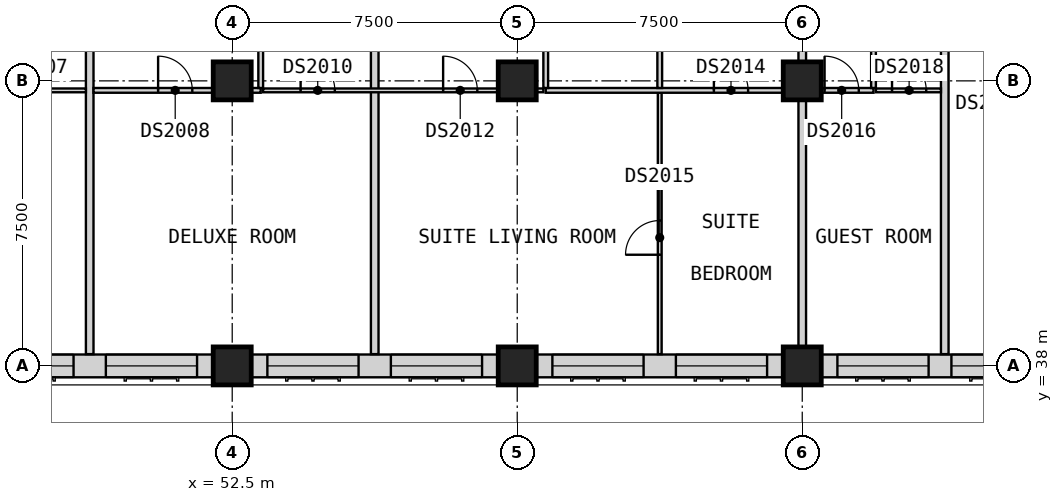
"""IFC4 building model, lengths in metres.
Left out: names, types, materials, properties, quantities, classifications, styles, units other than length and angle.
Written with IfcOpenShell. Run it as: python <this file> out.ifc"""

import sys

from ifc_helpers import new_model, si_unit, direction, frame, frame_2d, origin, origin_2d, place, context, subcontext, project, spatial, rectangle, extrude, element, fill, save


model = new_model("IFC4")
c1 = context("Model", 3, precision=1e-05, world=origin(), true_north=direction((0.0, 1.0)))
c2 = subcontext(c1, "Body", "Model", "MODEL_VIEW")
j1 = project(units=[si_unit("LENGTHUNIT", "METRE"), si_unit("PLANEANGLEUNIT", "RADIAN")], contexts=[c1])
p1 = place(None, origin())
s1 = spatial("IfcSite", under=j1, at=p1, CompositionType="ELEMENT")
p2 = place(p1, origin())
s2 = spatial("IfcBuilding", under=s1, at=p2, CompositionType="ELEMENT")
p3 = place(p2, frame((0.0, 0.0, 162.6)))
s3 = spatial("IfcBuildingStorey", under=s2, at=p3, CompositionType="ELEMENT", Elevation=162.6)
for number, where, z_axis, x_axis in (
    (1, (52.5, 38.0, 0.0), (0.0, 0.0, 1.0), (1.0, 0.0, 0.0)),
    (2, (52.5, 45.5, 0.0), (0.0, 0.0, 1.0), (1.0, 0.0, 0.0)),
    (3, (60.0, 38.0, 0.0), (0.0, 0.0, 1.0), (1.0, 0.0, 0.0)),
    (4, (60.0, 45.5, 0.0), (0.0, 0.0, 1.0), (1.0, 0.0, 0.0)),
    (5, (67.5, 38.0, 0.0), (0.0, 0.0, 1.0), (1.0, 0.0, 0.0)),
    (6, (67.5, 45.5, 0.0), (0.0, 0.0, 1.0), (1.0, 0.0, 0.0)),
):
    element("IfcColumn", number, at=place(p3, frame(where, z_axis=z_axis, x_axis=x_axis)), inside=s3, PredefinedType="COLUMN", context=c2, shape_type="SweptSolid", body=[
        extrude(rectangle(XDim=1.0, YDim=1.0, at=origin_2d()), origin(), (0.0, 0.0, 1.0), 3.6),
    ])
p4 = place(p3, frame((45.5, 38.0, 0.0), z_axis=(0.0, 0.0, 1.0), x_axis=(1.0, 0.0, 0.0)))
e7 = element("IfcWall", 7, at=p4, inside=s3, PredefinedType="SOLIDWALL", context=c2, shape_type="SweptSolid", body=[
    extrude(rectangle(XDim=6.5, YDim=0.6, at=frame_2d((3.25, 0.0))), origin(), (0.0, 0.0, 1.0), 2.85),
])
p5 = place(p4, frame((0.425, 0.0, 0.8)))
e8 = element("IfcOpeningElement", 8, at=p5, cuts=e7, PredefinedType="OPENING", context=c2, shape_type="SweptSolid", body=[
    extrude(rectangle(XDim=2.4, YDim=1.8, at=frame_2d((1.2, 0.9))), frame((0.0, 0.31, 0.0), z_axis=(0.0, -1.0, 0.0), x_axis=(1.0, 0.0, 0.0)), (0.0, 0.0, 1.0), 0.62),
])
p6 = place(p4, frame((3.675, 0.0, 0.8)))
e9 = element("IfcOpeningElement", 9, at=p6, cuts=e7, PredefinedType="OPENING", context=c2, shape_type="SweptSolid", body=[
    extrude(rectangle(XDim=2.4, YDim=1.8, at=frame_2d((1.2, 0.9))), frame((0.0, 0.31, 0.0), z_axis=(0.0, -1.0, 0.0), x_axis=(1.0, 0.0, 0.0)), (0.0, 0.0, 1.0), 0.62),
])
p7 = place(p3, frame((53.0, 38.0, 0.0), z_axis=(0.0, 0.0, 1.0), x_axis=(1.0, 0.0, 0.0)))
e10 = element("IfcWall", 10, at=p7, inside=s3, PredefinedType="SOLIDWALL", context=c2, shape_type="SweptSolid", body=[
    extrude(rectangle(XDim=6.5, YDim=0.6, at=frame_2d((3.25, 0.0))), origin(), (0.0, 0.0, 1.0), 2.85),
])
p8 = place(p7, frame((0.425, 0.0, 0.8)))
e11 = element("IfcOpeningElement", 11, at=p8, cuts=e10, PredefinedType="OPENING", context=c2, shape_type="SweptSolid", body=[
    extrude(rectangle(XDim=2.4, YDim=1.8, at=frame_2d((1.2, 0.9))), frame((0.0, 0.31, 0.0), z_axis=(0.0, -1.0, 0.0), x_axis=(1.0, 0.0, 0.0)), (0.0, 0.0, 1.0), 0.62),
])
p9 = place(p7, frame((3.675, 0.0, 0.8)))
e12 = element("IfcOpeningElement", 12, at=p9, cuts=e10, PredefinedType="OPENING", context=c2, shape_type="SweptSolid", body=[
    extrude(rectangle(XDim=2.4, YDim=1.8, at=frame_2d((1.2, 0.9))), frame((0.0, 0.31, 0.0), z_axis=(0.0, -1.0, 0.0), x_axis=(1.0, 0.0, 0.0)), (0.0, 0.0, 1.0), 0.62),
])
p10 = place(p3, frame((60.5, 38.0, 0.0), z_axis=(0.0, 0.0, 1.0), x_axis=(1.0, 0.0, 0.0)))
e13 = element("IfcWall", 13, at=p10, inside=s3, PredefinedType="SOLIDWALL", context=c2, shape_type="SweptSolid", body=[
    extrude(rectangle(XDim=6.5, YDim=0.6, at=frame_2d((3.25, 0.0))), origin(), (0.0, 0.0, 1.0), 2.85),
])
p11 = place(p10, frame((0.425, 0.0, 0.8)))
e14 = element("IfcOpeningElement", 14, at=p11, cuts=e13, PredefinedType="OPENING", context=c2, shape_type="SweptSolid", body=[
    extrude(rectangle(XDim=2.4, YDim=1.8, at=frame_2d((1.2, 0.9))), frame((0.0, 0.31, 0.0), z_axis=(0.0, -1.0, 0.0), x_axis=(1.0, 0.0, 0.0)), (0.0, 0.0, 1.0), 0.62),
])
p12 = place(p10, frame((3.675, 0.0, 0.8)))
e15 = element("IfcOpeningElement", 15, at=p12, cuts=e13, PredefinedType="OPENING", context=c2, shape_type="SweptSolid", body=[
    extrude(rectangle(XDim=2.4, YDim=1.8, at=frame_2d((1.2, 0.9))), frame((0.0, 0.31, 0.0), z_axis=(0.0, -1.0, 0.0), x_axis=(1.0, 0.0, 0.0)), (0.0, 0.0, 1.0), 0.62),
])
p13 = place(p3, frame((68.0, 38.0, 0.0), z_axis=(0.0, 0.0, 1.0), x_axis=(1.0, 0.0, 0.0)))
e16 = element("IfcWall", 16, at=p13, inside=s3, PredefinedType="SOLIDWALL", context=c2, shape_type="SweptSolid", body=[
    extrude(rectangle(XDim=6.0, YDim=0.6, at=frame_2d((3.0, 0.0))), origin(), (0.0, 0.0, 1.0), 2.85),
])
p14 = place(p13, frame((0.425, 0.0, 0.8)))
e17 = element("IfcOpeningElement", 17, at=p14, cuts=e16, PredefinedType="OPENING", context=c2, shape_type="SweptSolid", body=[
    extrude(rectangle(XDim=2.4, YDim=1.8, at=frame_2d((1.2, 0.9))), frame((0.0, 0.31, 0.0), z_axis=(0.0, -1.0, 0.0), x_axis=(1.0, 0.0, 0.0)), (0.0, 0.0, 1.0), 0.62),
])
p15 = place(p13, frame((3.425, 0.0, 0.8)))
e18 = element("IfcOpeningElement", 18, at=p15, cuts=e16, PredefinedType="OPENING", context=c2, shape_type="SweptSolid", body=[
    extrude(rectangle(XDim=2.4, YDim=1.8, at=frame_2d((1.2, 0.9))), frame((0.0, 0.31, 0.0), z_axis=(0.0, -1.0, 0.0), x_axis=(1.0, 0.0, 0.0)), (0.0, 0.0, 1.0), 0.62),
])
for number, where, z_axis, x_axis in (
    (19, (48.75, 38.31, 0.0), (0.0, 0.0, 1.0), (0.0, 1.0, 0.0)),
    (20, (56.25, 38.31, 0.0), (0.0, 0.0, 1.0), (0.0, 1.0, 0.0)),
):
    element("IfcWall", number, at=place(p3, frame(where, z_axis=z_axis, x_axis=x_axis)), inside=s3, PredefinedType="PARTITIONING", context=c2, shape_type="SweptSolid", body=[
        extrude(rectangle(XDim=11.715, YDim=0.2, at=frame_2d((5.857, 0.0))), origin(), (0.0, 0.0, 1.0), 3.2),
    ])
p16 = place(p3, frame((67.5, 37.5, 0.0), z_axis=(0.0, 0.0, 1.0), x_axis=(0.0, 1.0, 0.0)))
e21 = element("IfcWall", 21, at=p16, inside=s3, PredefinedType="PARTITIONING", context=c2, shape_type="SweptSolid", body=[
    extrude(rectangle(XDim=12.525, YDim=0.2, at=frame_2d((6.262, 0.0))), origin(), (0.0, 0.0, 1.0), 3.2),
])
p17 = place(p3, frame((71.25, 38.31, 0.0), z_axis=(0.0, 0.0, 1.0), x_axis=(0.0, 1.0, 0.0)))
e22 = element("IfcWall", 22, at=p17, inside=s3, PredefinedType="PARTITIONING", context=c2, shape_type="SweptSolid", body=[
    extrude(rectangle(XDim=11.715, YDim=0.2, at=frame_2d((5.857, 0.0))), origin(), (0.0, 0.0, 1.0), 3.2),
])
p18 = place(p3, frame((45.812, 45.25, 0.0), z_axis=(0.0, 0.0, 1.0), x_axis=(1.0, 0.0, 0.0)))
e23 = element("IfcWall", 23, at=p18, inside=s3, PredefinedType="PARTITIONING", context=c2, shape_type="SweptSolid", body=[
    extrude(rectangle(XDim=2.837, YDim=0.1, at=frame_2d((1.419, 0.0))), origin(), (0.0, 0.0, 1.0), 3.2),
])
p19 = place(p18, frame((0.988, 0.0, 0.0)))
e24 = element("IfcOpeningElement", 24, at=p19, cuts=e23, PredefinedType="OPENING", context=c2, shape_type="SweptSolid", body=[
    extrude(rectangle(XDim=0.9, YDim=2.1, at=frame_2d((0.45, 1.05))), frame((0.0, 0.06, 0.0), z_axis=(0.0, -1.0, 0.0), x_axis=(1.0, 0.0, 0.0)), (0.0, 0.0, 1.0), 0.12),
])
p20 = place(p3, frame((53.312, 45.25, 0.0), z_axis=(0.0, 0.0, 1.0), x_axis=(1.0, 0.0, 0.0)))
e25 = element("IfcWall", 25, at=p20, inside=s3, PredefinedType="PARTITIONING", context=c2, shape_type="SweptSolid", body=[
    extrude(rectangle(XDim=7.375, YDim=0.1, at=frame_2d((3.688, 0.0))), origin(), (0.0, 0.0, 1.0), 3.2),
])
p21 = place(p20, frame((0.988, 0.0, 0.0)))
e26 = element("IfcOpeningElement", 26, at=p21, cuts=e25, PredefinedType="OPENING", context=c2, shape_type="SweptSolid", body=[
    extrude(rectangle(XDim=0.9, YDim=2.1, at=frame_2d((0.45, 1.05))), frame((0.0, 0.06, 0.0), z_axis=(0.0, -1.0, 0.0), x_axis=(1.0, 0.0, 0.0)), (0.0, 0.0, 1.0), 0.12),
])
p22 = place(p20, frame((4.738, 0.0, 0.0)))
e27 = element("IfcOpeningElement", 27, at=p22, cuts=e25, PredefinedType="OPENING", context=c2, shape_type="SweptSolid", body=[
    extrude(rectangle(XDim=0.9, YDim=2.1, at=frame_2d((0.45, 1.05))), frame((0.0, 0.06, 0.0), z_axis=(0.0, -1.0, 0.0), x_axis=(1.0, 0.0, 0.0)), (0.0, 0.0, 1.0), 0.12),
])
p23 = place(p3, frame((69.438, 45.25, 0.0), z_axis=(0.0, 0.0, 1.0), x_axis=(1.0, 0.0, 0.0)))
e28 = element("IfcWall", 28, at=p23, inside=s3, PredefinedType="PARTITIONING", context=c2, shape_type="SweptSolid", body=[
    extrude(rectangle(XDim=1.712, YDim=0.1, at=frame_2d((0.856, 0.0))), origin(), (0.0, 0.0, 1.0), 3.2),
])
p24 = place(p23, frame((0.425, 0.0, 0.0)))
e29 = element("IfcOpeningElement", 29, at=p24, cuts=e28, PredefinedType="OPENING", context=c2, shape_type="SweptSolid", body=[
    extrude(rectangle(XDim=0.9, YDim=2.1, at=frame_2d((0.45, 1.05))), frame((0.0, 0.06, 0.0), z_axis=(0.0, -1.0, 0.0), x_axis=(1.0, 0.0, 0.0)), (0.0, 0.0, 1.0), 0.12),
])
p25 = place(p3, frame((63.75, 38.31, 0.0), z_axis=(0.0, 0.0, 1.0), x_axis=(0.0, 1.0, 0.0)))
e30 = element("IfcWall", 30, at=p25, inside=s3, PredefinedType="PARTITIONING", context=c2, shape_type="SweptSolid", body=[
    extrude(rectangle(XDim=6.877, YDim=0.1, at=frame_2d((3.439, 0.0))), origin(), (0.0, 0.0, 1.0), 3.2),
])
p26 = place(p25, frame((2.615, 0.0, 0.0)))
e31 = element("IfcOpeningElement", 31, at=p26, cuts=e30, PredefinedType="OPENING", context=c2, shape_type="SweptSolid", body=[
    extrude(rectangle(XDim=0.9, YDim=2.1, at=frame_2d((0.45, 1.05))), frame((0.0, 0.06, 0.0), z_axis=(0.0, -1.0, 0.0), x_axis=(1.0, 0.0, 0.0)), (0.0, 0.0, 1.0), 0.12),
])
p27 = place(p3, frame((48.85, 45.25, 0.0), z_axis=(0.0, 0.0, 1.0), x_axis=(1.0, 0.0, 0.0)))
e32 = element("IfcWall", 32, at=p27, inside=s3, PredefinedType="PARTITIONING", context=c2, shape_type="SweptSolid", body=[
    extrude(rectangle(XDim=4.4, YDim=0.125, at=frame_2d((2.2, 0.0))), origin(), (0.0, 0.0, 1.0), 3.2),
])
p28 = place(p27, frame((1.7, 0.0, 0.0)))
e33 = element("IfcOpeningElement", 33, at=p28, cuts=e32, PredefinedType="OPENING", context=c2, shape_type="SweptSolid", body=[
    extrude(rectangle(XDim=0.9, YDim=2.1, at=frame_2d((0.45, 1.05))), frame((0.0, 0.073, 0.0), z_axis=(0.0, -1.0, 0.0), x_axis=(1.0, 0.0, 0.0)), (0.0, 0.0, 1.0), 0.145),
])
p29 = place(p3, frame((60.75, 45.25, 0.0), z_axis=(0.0, 0.0, 1.0), x_axis=(1.0, 0.0, 0.0)))
e34 = element("IfcWall", 34, at=p29, inside=s3, PredefinedType="PARTITIONING", context=c2, shape_type="SweptSolid", body=[
    extrude(rectangle(XDim=8.625, YDim=0.125, at=frame_2d((4.312, 0.0))), origin(), (0.0, 0.0, 1.0), 3.2),
])
p30 = place(p29, frame((4.425, 0.0, 0.0)))
e35 = element("IfcOpeningElement", 35, at=p30, cuts=e34, PredefinedType="OPENING", context=c2, shape_type="SweptSolid", body=[
    extrude(rectangle(XDim=0.9, YDim=2.1, at=frame_2d((0.45, 1.05))), frame((0.0, 0.073, 0.0), z_axis=(0.0, -1.0, 0.0), x_axis=(1.0, 0.0, 0.0)), (0.0, 0.0, 1.0), 0.145),
])
p31 = place(p29, frame((7.337, 0.0, 0.0)))
e36 = element("IfcOpeningElement", 36, at=p31, cuts=e34, PredefinedType="OPENING", context=c2, shape_type="SweptSolid", body=[
    extrude(rectangle(XDim=0.9, YDim=2.1, at=frame_2d((0.45, 1.05))), frame((0.0, 0.073, 0.0), z_axis=(0.0, -1.0, 0.0), x_axis=(1.0, 0.0, 0.0)), (0.0, 0.0, 1.0), 0.145),
])
p32 = place(p3, frame((53.25, 45.312, 0.0), z_axis=(0.0, 0.0, 1.0), x_axis=(0.0, 1.0, 0.0)))
e37 = element("IfcWall", 37, at=p32, inside=s3, PredefinedType="PARTITIONING", context=c2, shape_type="SweptSolid", body=[
    extrude(rectangle(XDim=4.712, YDim=0.125, at=frame_2d((2.356, 0.0))), origin(), (0.0, 0.0, 1.0), 3.2),
])
p33 = place(p3, frame((60.75, 45.312, 0.0), z_axis=(0.0, 0.0, 1.0), x_axis=(0.0, 1.0, 0.0)))
e38 = element("IfcWall", 38, at=p33, inside=s3, PredefinedType="PARTITIONING", context=c2, shape_type="SweptSolid", body=[
    extrude(rectangle(XDim=4.712, YDim=0.125, at=frame_2d((2.356, 0.0))), origin(), (0.0, 0.0, 1.0), 3.2),
])
p34 = place(p33, frame((1.913, 0.0, 0.0)))
e39 = element("IfcOpeningElement", 39, at=p34, cuts=e38, PredefinedType="OPENING", context=c2, shape_type="SweptSolid", body=[
    extrude(rectangle(XDim=0.9, YDim=2.1, at=frame_2d((0.45, 1.05))), frame((0.0, 0.073, 0.0), z_axis=(0.0, -1.0, 0.0), x_axis=(1.0, 0.0, 0.0)), (0.0, 0.0, 1.0), 0.145),
])
for number, where, z_axis, x_axis in (
    (40, (63.75, 45.312, 0.0), (0.0, 0.0, 1.0), (0.0, 1.0, 0.0)),
    (41, (69.375, 45.312, 0.0), (0.0, 0.0, 1.0), (0.0, 1.0, 0.0)),
):
    element("IfcWall", number, at=place(p3, frame(where, z_axis=z_axis, x_axis=x_axis)), inside=s3, PredefinedType="PARTITIONING", context=c2, shape_type="SweptSolid", body=[
        extrude(rectangle(XDim=4.712, YDim=0.125, at=frame_2d((2.356, 0.0))), origin(), (0.0, 0.0, 1.0), 3.2),
    ])
p35 = place(p5, origin())
e42 = element("IfcWindow", 42, at=p35, inside=s3, PartitioningType="SINGLE_PANEL", PredefinedType="WINDOW", context=c2, shape_type="SweptSolid", body=[
    extrude(rectangle(XDim=2.4, YDim=1.8, at=frame_2d((1.2, 0.9))), frame((0.0, -0.07, 0.0), z_axis=(0.0, -1.0, 0.0), x_axis=(1.0, 0.0, 0.0)), (0.0, 0.0, 1.0), 0.06),
])
fill(e8, e42)
p36 = place(p6, origin())
e43 = element("IfcWindow", 43, at=p36, inside=s3, PartitioningType="SINGLE_PANEL", PredefinedType="WINDOW", context=c2, shape_type="SweptSolid", body=[
    extrude(rectangle(XDim=2.4, YDim=1.8, at=frame_2d((1.2, 0.9))), frame((0.0, -0.07, 0.0), z_axis=(0.0, -1.0, 0.0), x_axis=(1.0, 0.0, 0.0)), (0.0, 0.0, 1.0), 0.06),
])
fill(e9, e43)
p37 = place(p8, origin())
e44 = element("IfcWindow", 44, at=p37, inside=s3, PartitioningType="SINGLE_PANEL", PredefinedType="WINDOW", context=c2, shape_type="SweptSolid", body=[
    extrude(rectangle(XDim=2.4, YDim=1.8, at=frame_2d((1.2, 0.9))), frame((0.0, -0.07, 0.0), z_axis=(0.0, -1.0, 0.0), x_axis=(1.0, 0.0, 0.0)), (0.0, 0.0, 1.0), 0.06),
])
fill(e11, e44)
p38 = place(p9, origin())
e45 = element("IfcWindow", 45, at=p38, inside=s3, PartitioningType="SINGLE_PANEL", PredefinedType="WINDOW", context=c2, shape_type="SweptSolid", body=[
    extrude(rectangle(XDim=2.4, YDim=1.8, at=frame_2d((1.2, 0.9))), frame((0.0, -0.07, 0.0), z_axis=(0.0, -1.0, 0.0), x_axis=(1.0, 0.0, 0.0)), (0.0, 0.0, 1.0), 0.06),
])
fill(e12, e45)
p39 = place(p11, origin())
e46 = element("IfcWindow", 46, at=p39, inside=s3, PartitioningType="SINGLE_PANEL", PredefinedType="WINDOW", context=c2, shape_type="SweptSolid", body=[
    extrude(rectangle(XDim=2.4, YDim=1.8, at=frame_2d((1.2, 0.9))), frame((0.0, -0.07, 0.0), z_axis=(0.0, -1.0, 0.0), x_axis=(1.0, 0.0, 0.0)), (0.0, 0.0, 1.0), 0.06),
])
fill(e14, e46)
p40 = place(p12, origin())
e47 = element("IfcWindow", 47, at=p40, inside=s3, PartitioningType="SINGLE_PANEL", PredefinedType="WINDOW", context=c2, shape_type="SweptSolid", body=[
    extrude(rectangle(XDim=2.4, YDim=1.8, at=frame_2d((1.2, 0.9))), frame((0.0, -0.07, 0.0), z_axis=(0.0, -1.0, 0.0), x_axis=(1.0, 0.0, 0.0)), (0.0, 0.0, 1.0), 0.06),
])
fill(e15, e47)
p41 = place(p14, origin())
e48 = element("IfcWindow", 48, at=p41, inside=s3, PartitioningType="SINGLE_PANEL", PredefinedType="WINDOW", context=c2, shape_type="SweptSolid", body=[
    extrude(rectangle(XDim=2.4, YDim=1.8, at=frame_2d((1.2, 0.9))), frame((0.0, -0.07, 0.0), z_axis=(0.0, -1.0, 0.0), x_axis=(1.0, 0.0, 0.0)), (0.0, 0.0, 1.0), 0.06),
])
fill(e17, e48)
p42 = place(p15, origin())
e49 = element("IfcWindow", 49, at=p42, inside=s3, PartitioningType="SINGLE_PANEL", PredefinedType="WINDOW", context=c2, shape_type="SweptSolid", body=[
    extrude(rectangle(XDim=2.4, YDim=1.8, at=frame_2d((1.2, 0.9))), frame((0.0, -0.07, 0.0), z_axis=(0.0, -1.0, 0.0), x_axis=(1.0, 0.0, 0.0)), (0.0, 0.0, 1.0), 0.06),
])
fill(e18, e49)
p43 = place(p28, origin())
e50 = element("IfcDoor", 50, at=p43, inside=s3, OperationType="SINGLE_SWING_LEFT", PredefinedType="DOOR", context=c2, shape_type="SweptSolid", body=[
    extrude(rectangle(XDim=0.9, YDim=2.1, at=frame_2d((0.45, 1.05))), frame((0.0, 0.025, 0.0), z_axis=(0.0, -1.0, 0.0), x_axis=(1.0, 0.0, 0.0)), (0.0, 0.0, 1.0), 0.05),
])
fill(e33, e50)
p44 = place(p21, origin())
e51 = element("IfcDoor", 51, at=p44, inside=s3, OperationType="SINGLE_SWING_LEFT", PredefinedType="DOOR", context=c2, shape_type="SweptSolid", body=[
    extrude(rectangle(XDim=0.9, YDim=2.1, at=frame_2d((0.45, 1.05))), frame((0.0, 0.025, 0.0), z_axis=(0.0, -1.0, 0.0), x_axis=(1.0, 0.0, 0.0)), (0.0, 0.0, 1.0), 0.05),
])
fill(e26, e51)
p45 = place(p22, origin())
e52 = element("IfcDoor", 52, at=p45, inside=s3, OperationType="SINGLE_SWING_LEFT", PredefinedType="DOOR", context=c2, shape_type="SweptSolid", body=[
    extrude(rectangle(XDim=0.9, YDim=2.1, at=frame_2d((0.45, 1.05))), frame((0.0, 0.025, 0.0), z_axis=(0.0, -1.0, 0.0), x_axis=(1.0, 0.0, 0.0)), (0.0, 0.0, 1.0), 0.05),
])
fill(e27, e52)
p46 = place(p30, origin())
e53 = element("IfcDoor", 53, at=p46, inside=s3, OperationType="SINGLE_SWING_LEFT", PredefinedType="DOOR", context=c2, shape_type="SweptSolid", body=[
    extrude(rectangle(XDim=0.9, YDim=2.1, at=frame_2d((0.45, 1.05))), frame((0.0, 0.025, 0.0), z_axis=(0.0, -1.0, 0.0), x_axis=(1.0, 0.0, 0.0)), (0.0, 0.0, 1.0), 0.05),
])
fill(e35, e53)
p47 = place(p26, origin())
e54 = element("IfcDoor", 54, at=p47, inside=s3, OperationType="SINGLE_SWING_LEFT", PredefinedType="DOOR", context=c2, shape_type="SweptSolid", body=[
    extrude(rectangle(XDim=0.9, YDim=2.1, at=frame_2d((0.45, 1.05))), frame((0.0, 0.025, 0.0), z_axis=(0.0, -1.0, 0.0), x_axis=(1.0, 0.0, 0.0)), (0.0, 0.0, 1.0), 0.05),
])
fill(e31, e54)
p48 = place(p31, origin())
e55 = element("IfcDoor", 55, at=p48, inside=s3, OperationType="SINGLE_SWING_RIGHT", PredefinedType="DOOR", context=c2, shape_type="SweptSolid", body=[
    extrude(rectangle(XDim=0.9, YDim=2.1, at=frame_2d((0.45, 1.05))), frame((0.0, 0.025, 0.0), z_axis=(0.0, -1.0, 0.0), x_axis=(1.0, 0.0, 0.0)), (0.0, 0.0, 1.0), 0.05),
])
fill(e36, e55)
p49 = place(p24, origin())
e56 = element("IfcDoor", 56, at=p49, inside=s3, OperationType="SINGLE_SWING_LEFT", PredefinedType="DOOR", context=c2, shape_type="SweptSolid", body=[
    extrude(rectangle(XDim=0.9, YDim=2.1, at=frame_2d((0.45, 1.05))), frame((0.0, 0.025, 0.0), z_axis=(0.0, -1.0, 0.0), x_axis=(1.0, 0.0, 0.0)), (0.0, 0.0, 1.0), 0.05),
])
fill(e29, e56)
save(model, sys.argv[1])
